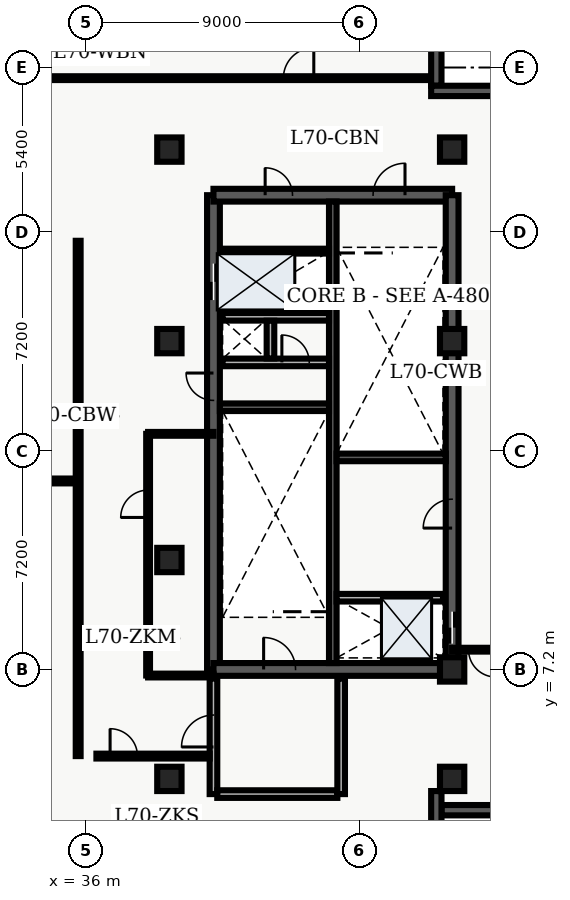
"""IFC4 building model, lengths in metres.
Left out: names, types, materials, properties, quantities, classifications, styles, units other than length and angle.
Written with IfcOpenShell. Run it as: python <this file> out.ifc"""

import sys

from ifc_helpers import new_model, entity, si_unit, converted_unit, direction, frame, origin_with_axes, origin_2d_with_axis, place, context, subcontext, project, spatial, polyline, rectangle, outline, extrude, element, fill, save


model = new_model("IFC4")
c1 = context("Model", 3, precision=1e-05, world=origin_with_axes(), true_north=direction((0.0, 1.0)))
c2 = subcontext(c1, "Body", "Model", "MODEL_VIEW")
j1 = project(units=[si_unit("LENGTHUNIT", "METRE"), converted_unit("PLANEANGLEUNIT", "DEGREE", entity("IfcPlaneAngleMeasure", 0.017), si_unit("PLANEANGLEUNIT", "RADIAN"), dimensions=[0, 0, 0, 0, 0, 0, 0])], contexts=[c1])
p1 = place(None, origin_with_axes())
s1 = spatial("IfcSite", under=j1, at=p1, CompositionType="ELEMENT")
p2 = place(p1, origin_with_axes())
s2 = spatial("IfcBuilding", under=s1, at=p2, CompositionType="ELEMENT")
p3 = place(p2, frame((0.0, 0.0, 284.1), z_axis=(0.0, 0.0, 1.0), x_axis=(1.0, 0.0, 0.0)))
s3 = spatial("IfcBuildingStorey", under=s2, at=p3, CompositionType="ELEMENT", Elevation=284.1)
p4 = place(p3, frame((40.2, 7.2, 0.0), z_axis=(0.0, 0.0, 1.0), x_axis=(0.0, 1.0, 0.0)))
e1 = element("IfcWall", 1, at=p4, inside=s3, PredefinedType="SHEAR", context=c2, shape_type="SweptSolid", body=[
    extrude(outline(polyline([(0.0, -0.21), (15.6, -0.21), (15.6, 0.21), (0.0, 0.21), (0.0, -0.21)])), origin_with_axes(), (0.0, 0.0, 1.0), 3.6),
])
p5 = place(p4, frame((12.75, 0.0, 0.0), z_axis=(0.0, 0.0, 1.0), x_axis=(1.0, 0.0, 0.0)))
e2 = element("IfcOpeningElement", 2, at=p5, cuts=e1, PredefinedType="OPENING", context=c2, shape_type="SweptSolid", body=[
    extrude(rectangle(XDim=1.2, YDim=0.44, at=origin_2d_with_axis()), origin_with_axes(), (0.0, 0.0, 1.0), 2.15),
])
p6 = place(p4, frame((9.3, 0.0, 0.0), z_axis=(0.0, 0.0, 1.0), x_axis=(1.0, 0.0, 0.0)))
e3 = element("IfcOpeningElement", 3, at=p6, cuts=e1, PredefinedType="OPENING", context=c2, shape_type="SweptSolid", body=[
    extrude(rectangle(XDim=0.9, YDim=0.44, at=origin_2d_with_axis()), origin_with_axes(), (0.0, 0.0, 1.0), 2.15),
])
p7 = place(p3, frame((40.2, 7.2, 0.0), z_axis=(0.0, 0.0, 1.0), x_axis=(1.0, 0.0, 0.0)))
e4 = element("IfcWall", 4, at=p7, inside=s3, PredefinedType="SHEAR", context=c2, shape_type="SweptSolid", body=[
    extrude(outline(polyline([(0.0, -0.21), (7.85, -0.21), (7.85, 0.21), (0.0, 0.21), (0.0, -0.21)])), origin_with_axes(), (0.0, 0.0, 1.0), 3.6),
])
p8 = place(p7, frame((2.175, 0.0, 0.0), z_axis=(0.0, 0.0, 1.0), x_axis=(1.0, 0.0, 0.0)))
e5 = element("IfcOpeningElement", 5, at=p8, cuts=e4, PredefinedType="OPENING", context=c2, shape_type="SweptSolid", body=[
    extrude(rectangle(XDim=1.05, YDim=0.44, at=origin_2d_with_axis()), origin_with_axes(), (0.0, 0.0, 1.0), 2.15),
])
p9 = place(p3, frame((40.2, 22.8, 0.0), z_axis=(0.0, 0.0, 1.0), x_axis=(1.0, 0.0, 0.0)))
e6 = element("IfcWall", 6, at=p9, inside=s3, PredefinedType="SHEAR", context=c2, shape_type="SweptSolid", body=[
    extrude(outline(polyline([(0.0, -0.21), (7.85, -0.21), (7.85, 0.21), (0.0, 0.21), (0.0, -0.21)])), origin_with_axes(), (0.0, 0.0, 1.0), 3.6),
])
p10 = place(p9, frame((5.775, 0.0, 0.0), z_axis=(0.0, 0.0, 1.0), x_axis=(1.0, 0.0, 0.0)))
e7 = element("IfcOpeningElement", 7, at=p10, cuts=e6, PredefinedType="OPENING", context=c2, shape_type="SweptSolid", body=[
    extrude(rectangle(XDim=1.05, YDim=0.44, at=origin_2d_with_axis()), origin_with_axes(), (0.0, 0.0, 1.0), 2.15),
])
p11 = place(p9, frame((2.15, 0.0, 0.0), z_axis=(0.0, 0.0, 1.0), x_axis=(1.0, 0.0, 0.0)))
e8 = element("IfcOpeningElement", 8, at=p11, cuts=e6, PredefinedType="OPENING", context=c2, shape_type="SweptSolid", body=[
    extrude(rectangle(XDim=0.9, YDim=0.44, at=origin_2d_with_axis()), origin_with_axes(), (0.0, 0.0, 1.0), 2.15),
])
p12 = place(p3, frame((48.05, 7.2, 0.0), z_axis=(0.0, 0.0, 1.0), x_axis=(0.0, 1.0, 0.0)))
e9 = element("IfcWall", 9, at=p12, inside=s3, PredefinedType="SHEAR", context=c2, shape_type="SweptSolid", body=[
    extrude(outline(polyline([(0.0, -0.21), (15.6, -0.21), (15.6, 0.21), (0.0, 0.21), (0.0, -0.21)])), origin_with_axes(), (0.0, 0.0, 1.0), 3.6),
])
p13 = place(p12, frame((1.375, 0.0, 0.0), z_axis=(0.0, 0.0, 1.0), x_axis=(1.0, 0.0, 0.0)))
e10 = element("IfcOpeningElement", 10, at=p13, cuts=e9, PredefinedType="OPENING", context=c2, shape_type="SweptSolid", body=[
    extrude(rectangle(XDim=1.05, YDim=0.44, at=origin_2d_with_axis()), origin_with_axes(), (0.0, 0.0, 1.0), 2.15),
])
p14 = place(p12, frame((5.125, 0.0, 0.0), z_axis=(0.0, 0.0, 1.0), x_axis=(1.0, 0.0, 0.0)))
e11 = element("IfcOpeningElement", 11, at=p14, cuts=e9, PredefinedType="OPENING", context=c2, shape_type="SweptSolid", body=[
    extrude(rectangle(XDim=0.95, YDim=0.44, at=origin_2d_with_axis()), origin_with_axes(), (0.0, 0.0, 1.0), 2.15),
])
p15 = place(p3, frame((44.125, 7.41, 0.0), z_axis=(0.0, 0.0, 1.0), x_axis=(0.0, 1.0, 0.0)))
e12 = element("IfcWall", 12, at=p15, inside=s3, PredefinedType="SHEAR", context=c2, shape_type="SweptSolid", body=[
    extrude(outline(polyline([(0.0, -0.125), (15.18, -0.125), (15.18, 0.125), (0.0, 0.125), (0.0, -0.125)])), origin_with_axes(), (0.0, 0.0, 1.0), 3.6),
])
for number, where, z_axis, x_axis in (
    (13, (40.41, 15.825, 0.0), (0.0, 0.0, 1.0), (1.0, 0.0, 0.0)),
    (14, (44.25, 14.175, 0.0), (0.0, 0.0, 1.0), (1.0, 0.0, 0.0)),
):
    element("IfcWall", number, at=place(p3, frame(where, z_axis=z_axis, x_axis=x_axis)), inside=s3, PredefinedType="SHEAR", context=c2, shape_type="SweptSolid", body=[
        extrude(outline(polyline([(0.0, -0.125), (3.59, -0.125), (3.59, 0.125), (0.0, 0.125), (0.0, -0.125)])), origin_with_axes(), (0.0, 0.0, 1.0), 3.6),
    ])
p16 = place(p3, frame((40.5, 17.3, 0.0), z_axis=(0.0, 0.0, 1.0), x_axis=(1.0, 0.0, 0.0)))
e15 = element("IfcWall", 15, at=p16, inside=s3, PredefinedType="SOLIDWALL", context=c2, shape_type="SweptSolid", body=[
    extrude(outline(polyline([(0.0, -0.125), (3.5, -0.125), (3.5, 0.125), (0.0, 0.125), (0.0, -0.125)])), origin_with_axes(), (0.0, 0.0, 1.0), 2.64),
])
p17 = place(p16, frame((2.4, 0.0, 0.0), z_axis=(0.0, 0.0, 1.0), x_axis=(1.0, 0.0, 0.0)))
e16 = element("IfcOpeningElement", 16, at=p17, cuts=e15, PredefinedType="OPENING", context=c2, shape_type="SweptSolid", body=[
    extrude(rectangle(XDim=0.9, YDim=0.27, at=origin_2d_with_axis()), origin_with_axes(), (0.0, 0.0, 1.0), 2.15),
])
p18 = place(p3, frame((40.5, 18.8, 0.0), z_axis=(0.0, 0.0, 1.0), x_axis=(1.0, 0.0, 0.0)))
e17 = element("IfcWall", 17, at=p18, inside=s3, PredefinedType="SOLIDWALL", context=c2, shape_type="SweptSolid", body=[
    extrude(outline(polyline([(0.0, -0.125), (3.5, -0.125), (3.5, 0.125), (0.0, 0.125), (0.0, -0.125)])), origin_with_axes(), (0.0, 0.0, 1.0), 2.64),
])
p19 = place(p3, frame((42.075, 17.43, 0.0), z_axis=(0.0, 0.0, 1.0), x_axis=(0.0, 1.0, 0.0)))
e18 = element("IfcWall", 18, at=p19, inside=s3, PredefinedType="SOLIDWALL", context=c2, shape_type="SweptSolid", body=[
    extrude(outline(polyline([(0.0, -0.125), (1.24, -0.125), (1.24, 0.125), (0.0, 0.125), (0.0, -0.125)])), origin_with_axes(), (0.0, 0.0, 1.0), 2.64),
])
p20 = place(p3, frame((40.2, 3.1, 0.0), z_axis=(0.0, 0.0, 1.0), x_axis=(0.0, 1.0, 0.0)))
e19 = element("IfcWall", 19, at=p20, inside=s3, PredefinedType="SOLIDWALL", context=c2, shape_type="SweptSolid", body=[
    extrude(outline(polyline([(0.0, -0.125), (3.8, -0.125), (3.8, 0.125), (0.0, 0.125), (0.0, -0.125)])), origin_with_axes(), (0.0, 0.0, 1.0), 2.64),
])
p21 = place(p20, frame((2.075, 0.0, 0.0), z_axis=(0.0, 0.0, 1.0), x_axis=(1.0, 0.0, 0.0)))
e20 = element("IfcOpeningElement", 20, at=p21, cuts=e19, PredefinedType="OPENING", context=c2, shape_type="SweptSolid", body=[
    extrude(rectangle(XDim=1.05, YDim=0.27, at=origin_2d_with_axis()), origin_with_axes(), (0.0, 0.0, 1.0), 2.15),
])
p22 = place(p3, frame((40.325, 3.1, 0.0), z_axis=(0.0, 0.0, 1.0), x_axis=(1.0, 0.0, 0.0)))
e21 = element("IfcWall", 21, at=p22, inside=s3, PredefinedType="SOLIDWALL", context=c2, shape_type="SweptSolid", body=[
    extrude(outline(polyline([(0.0, -0.125), (3.95, -0.125), (3.95, 0.125), (0.0, 0.125), (0.0, -0.125)])), origin_with_axes(), (0.0, 0.0, 1.0), 2.64),
])
p23 = place(p3, frame((44.4, 3.1, 0.0), z_axis=(0.0, 0.0, 1.0), x_axis=(0.0, 1.0, 0.0)))
e22 = element("IfcWall", 22, at=p23, inside=s3, PredefinedType="SOLIDWALL", context=c2, shape_type="SweptSolid", body=[
    extrude(outline(polyline([(0.0, -0.125), (3.8, -0.125), (3.8, 0.125), (0.0, 0.125), (0.0, -0.125)])), origin_with_axes(), (0.0, 0.0, 1.0), 2.64),
])
for number, where, z_axis, x_axis in (
    (23, (38.75, 3.6, 0.0), (0.0, 0.0, 1.0), (1.0, 0.0, 0.0)),
    (24, (38.75, 10.8, 0.0), (0.0, 0.0, 1.0), (1.0, 0.0, 0.0)),
    (25, (38.75, 18.0, 0.0), (0.0, 0.0, 1.0), (1.0, 0.0, 0.0)),
    (26, (38.75, 24.3, 0.0), (0.0, 0.0, 1.0), (1.0, 0.0, 0.0)),
    (27, (48.05, 3.6, 0.0), (0.0, 0.0, 1.0), (1.0, 0.0, 0.0)),
    (28, (48.05, 7.2, 0.0), (0.0, 0.0, 1.0), (1.0, 0.0, 0.0)),
    (29, (48.05, 18.0, 0.0), (0.0, 0.0, 1.0), (1.0, 0.0, 0.0)),
    (30, (48.05, 24.3, 0.0), (0.0, 0.0, 1.0), (1.0, 0.0, 0.0)),
):
    element("IfcColumn", number, at=place(p3, frame(where, z_axis=z_axis, x_axis=x_axis)), inside=s3, PredefinedType="COLUMN", context=c2, shape_type="SweptSolid", body=[
        extrude(rectangle(XDim=0.8, YDim=0.8, at=origin_2d_with_axis()), origin_with_axes(), (0.0, 0.0, 1.0), 3.9),
    ])
p24 = place(p3, frame((40.5, 20.96, 0.0), z_axis=(0.0, 0.0, 1.0), x_axis=(1.0, 0.0, 0.0)))
e31 = element("IfcWall", 31, at=p24, inside=s3, PredefinedType="PARTITIONING", context=c2, shape_type="SweptSolid", body=[
    extrude(outline(polyline([(0.0, -0.08), (3.5, -0.08), (3.5, 0.08), (0.0, 0.08), (0.0, -0.08)])), origin_with_axes(), (0.0, 0.0, 1.0), 2.64),
])
p25 = place(p3, frame((44.25, 9.56, 0.0), z_axis=(0.0, 0.0, 1.0), x_axis=(1.0, 0.0, 0.0)))
e32 = element("IfcWall", 32, at=p25, inside=s3, PredefinedType="SOLIDWALL", context=c2, shape_type="SweptSolid", body=[
    extrude(outline(polyline([(0.0, -0.125), (3.5, -0.125), (3.5, 0.125), (0.0, 0.125), (0.0, -0.125)])), origin_with_axes(), (0.0, 0.0, 1.0), 2.64),
])
p26 = place(p3, frame((20.3, 13.4, 0.0), z_axis=(0.0, 0.0, 1.0), x_axis=(1.0, 0.0, 0.0)))
e33 = element("IfcWall", 33, at=p26, inside=s3, PredefinedType="PARTITIONING", context=c2, shape_type="SweptSolid", body=[
    extrude(outline(polyline([(0.0, -0.08), (15.45, -0.08), (15.45, 0.08), (0.0, 0.08), (0.0, -0.08)])), origin_with_axes(), (0.0, 0.0, 1.0), 2.64),
])
p27 = place(p26, frame((2.304, 0.0, 0.0), z_axis=(0.0, 0.0, 1.0), x_axis=(1.0, 0.0, 0.0)))
e34 = element("IfcOpeningElement", 34, at=p27, cuts=e33, PredefinedType="OPENING", context=c2, shape_type="SweptSolid", body=[
    extrude(rectangle(XDim=1.0, YDim=0.18, at=origin_2d_with_axis()), origin_with_axes(), (0.0, 0.0, 1.0), 2.15),
])
p28 = place(p26, frame((6.866, 0.0, 0.0), z_axis=(0.0, 0.0, 1.0), x_axis=(1.0, 0.0, 0.0)))
e35 = element("IfcOpeningElement", 35, at=p28, cuts=e33, PredefinedType="OPENING", context=c2, shape_type="SweptSolid", body=[
    extrude(rectangle(XDim=1.0, YDim=0.18, at=origin_2d_with_axis()), origin_with_axes(), (0.0, 0.0, 1.0), 2.15),
])
p29 = place(p26, frame((12.337, 0.0, 0.0), z_axis=(0.0, 0.0, 1.0), x_axis=(1.0, 0.0, 0.0)))
e36 = element("IfcOpeningElement", 36, at=p29, cuts=e33, PredefinedType="OPENING", context=c2, shape_type="SweptSolid", body=[
    extrude(rectangle(XDim=1.2, YDim=0.18, at=origin_2d_with_axis()), origin_with_axes(), (0.0, 0.0, 1.0), 2.2),
])
p30 = place(p3, frame((20.3, 15.7, 0.0), z_axis=(0.0, 0.0, 1.0), x_axis=(1.0, 0.0, 0.0)))
e37 = element("IfcWall", 37, at=p30, inside=s3, PredefinedType="PARTITIONING", context=c2, shape_type="SweptSolid", body=[
    extrude(outline(polyline([(0.0, -0.08), (15.45, -0.08), (15.45, 0.08), (0.0, 0.08), (0.0, -0.08)])), origin_with_axes(), (0.0, 0.0, 1.0), 2.64),
])
p31 = place(p30, frame((7.775, 0.0, 0.0), z_axis=(0.0, 0.0, 1.0), x_axis=(1.0, 0.0, 0.0)))
e38 = element("IfcOpeningElement", 38, at=p31, cuts=e37, PredefinedType="OPENING", context=c2, shape_type="SweptSolid", body=[
    extrude(rectangle(XDim=1.0, YDim=0.18, at=origin_2d_with_axis()), origin_with_axes(), (0.0, 0.0, 1.0), 2.15),
])
p32 = place(p3, frame((35.75, 4.35, 0.0), z_axis=(0.0, 0.0, 1.0), x_axis=(0.0, 1.0, 0.0)))
e39 = element("IfcWall", 39, at=p32, inside=s3, PredefinedType="PARTITIONING", context=c2, shape_type="SweptSolid", body=[
    extrude(outline(polyline([(0.0, -0.08), (16.95, -0.08), (16.95, 0.08), (0.0, 0.08), (0.0, -0.08)])), origin_with_axes(), (0.0, 0.0, 1.0), 2.64),
])
p33 = place(p3, frame((49.765, 7.85, 0.0), z_axis=(0.0, 0.0, 1.0), x_axis=(-1.0, 0.0, 0.0)))
e40 = element("IfcWall", 40, at=p33, inside=s3, PredefinedType="PARTITIONING", context=c2, shape_type="SweptSolid", body=[
    extrude(outline(polyline([(0.0, -0.062), (1.715, -0.062), (1.715, 0.062), (0.0, 0.062), (0.0, -0.062)])), origin_with_axes(), (0.0, 0.0, 1.0), 2.64),
])
p34 = place(p33, frame((0.725, 0.0, 0.0), z_axis=(0.0, 0.0, 1.0), x_axis=(1.0, 0.0, 0.0)))
e41 = element("IfcOpeningElement", 41, at=p34, cuts=e40, PredefinedType="OPENING", context=c2, shape_type="SweptSolid", body=[
    extrude(rectangle(XDim=0.9, YDim=0.145, at=origin_2d_with_axis()), origin_with_axes(), (0.0, 0.0, 1.0), 2.15),
])
p35 = place(p3, frame((34.535, 26.65, 0.0), z_axis=(0.0, 0.0, 1.0), x_axis=(1.0, 0.0, 0.0)))
e42 = element("IfcWall", 42, at=p35, inside=s3, PredefinedType="PARTITIONING", context=c2, shape_type="SweptSolid", body=[
    extrude(outline(polyline([(0.0, -0.062), (12.995, -0.062), (12.995, 0.062), (0.0, 0.062), (0.0, -0.062)])), origin_with_axes(), (0.0, 0.0, 1.0), 2.64),
])
p36 = place(p35, frame((8.465, 0.0, 0.0), z_axis=(0.0, 0.0, 1.0), x_axis=(1.0, 0.0, 0.0)))
e43 = element("IfcOpeningElement", 43, at=p36, cuts=e42, PredefinedType="OPENING", context=c2, shape_type="SweptSolid", body=[
    extrude(rectangle(XDim=1.0, YDim=0.145, at=origin_2d_with_axis()), origin_with_axes(), (0.0, 0.0, 1.0), 2.15),
])
p37 = place(p3, frame((36.35, 4.35, 0.0), z_axis=(0.0, 0.0, 1.0), x_axis=(1.0, 0.0, 0.0)))
e44 = element("IfcWall", 44, at=p37, inside=s3, PredefinedType="PARTITIONING", context=c2, shape_type="SweptSolid", body=[
    extrude(outline(polyline([(0.0, -0.08), (3.725, -0.08), (3.725, 0.08), (0.0, 0.08), (0.0, -0.08)])), origin_with_axes(), (0.0, 0.0, 1.0), 2.64),
])
p38 = place(p37, frame((0.9, 0.0, 0.0), z_axis=(0.0, 0.0, 1.0), x_axis=(1.0, 0.0, 0.0)))
e45 = element("IfcOpeningElement", 45, at=p38, cuts=e44, PredefinedType="OPENING", context=c2, shape_type="SweptSolid", body=[
    extrude(rectangle(XDim=0.9, YDim=0.18, at=origin_2d_with_axis()), origin_with_axes(), (0.0, 0.0, 1.0), 2.15),
])
for number, where, z_axis, x_axis in (
    (46, (38.05, 7.0, 0.0), (0.0, 0.0, 1.0), (1.0, 0.0, 0.0)),
    (47, (38.05, 14.95, 0.0), (0.0, 0.0, 1.0), (1.0, 0.0, 0.0)),
):
    element("IfcWall", number, at=place(p3, frame(where, z_axis=z_axis, x_axis=x_axis)), inside=s3, PredefinedType="PARTITIONING", context=c2, shape_type="SweptSolid", body=[
        extrude(outline(polyline([(0.0, -0.062), (2.15, -0.062), (2.15, 0.062), (0.0, 0.062), (0.0, -0.062)])), origin_with_axes(), (0.0, 0.0, 1.0), 2.64),
    ])
p39 = place(p3, frame((38.05, 7.0, 0.0), z_axis=(0.0, 0.0, 1.0), x_axis=(0.0, 1.0, 0.0)))
e48 = element("IfcWall", 48, at=p39, inside=s3, PredefinedType="PARTITIONING", context=c2, shape_type="SweptSolid", body=[
    extrude(outline(polyline([(0.0, -0.062), (7.95, -0.062), (7.95, 0.062), (0.0, 0.062), (0.0, -0.062)])), origin_with_axes(), (0.0, 0.0, 1.0), 2.64),
])
p40 = place(p39, frame((5.65, 0.0, 0.0), z_axis=(0.0, 0.0, 1.0), x_axis=(1.0, 0.0, 0.0)))
e49 = element("IfcOpeningElement", 49, at=p40, cuts=e48, PredefinedType="OPENING", context=c2, shape_type="SweptSolid", body=[
    extrude(rectangle(XDim=0.9, YDim=0.145, at=origin_2d_with_axis()), origin_with_axes(), (0.0, 0.0, 1.0), 2.15),
])
p41 = place(p3, frame((47.53, 28.46, 0.0), z_axis=(0.0, 0.0, 1.0), x_axis=(0.0, -1.0, 0.0)))
e50 = element("IfcWall", 50, at=p41, inside=s3, PredefinedType="SOLIDWALL", context=c2, shape_type="SweptSolid", body=[
    extrude(outline(polyline([(0.0, -0.17), (2.06, -0.17), (2.06, 0.17), (0.0, 0.17), (0.0, -0.17)])), origin_with_axes(), (0.0, 0.0, 1.0), 3.6),
])
p42 = place(p3, frame((47.36, 26.23, 0.0), z_axis=(0.0, 0.0, 1.0), x_axis=(1.0, 0.0, 0.0)))
e51 = element("IfcWall", 51, at=p42, inside=s3, PredefinedType="SOLIDWALL", context=c2, shape_type="SweptSolid", body=[
    extrude(outline(polyline([(0.0, -0.17), (2.74, -0.17), (2.74, 0.17), (0.0, 0.17), (0.0, -0.17)])), origin_with_axes(), (0.0, 0.0, 1.0), 3.6),
])
p43 = place(p3, frame((49.76, 2.57, 0.0), z_axis=(0.0, 0.0, 1.0), x_axis=(-1.0, 0.0, 0.0)))
e52 = element("IfcWall", 52, at=p43, inside=s3, PredefinedType="SOLIDWALL", context=c2, shape_type="SweptSolid", body=[
    extrude(outline(polyline([(0.0, -0.17), (2.06, -0.17), (2.06, 0.17), (0.0, 0.17), (0.0, -0.17)])), origin_with_axes(), (0.0, 0.0, 1.0), 3.6),
])
p44 = place(p3, frame((47.53, 3.2, 0.0), z_axis=(0.0, 0.0, 1.0), x_axis=(0.0, -1.0, 0.0)))
e53 = element("IfcWall", 53, at=p44, inside=s3, PredefinedType="SOLIDWALL", context=c2, shape_type="SweptSolid", body=[
    extrude(outline(polyline([(0.0, -0.17), (3.2, -0.17), (3.2, 0.17), (0.0, 0.17), (0.0, -0.17)])), origin_with_axes(), (0.0, 0.0, 1.0), 3.6),
])
p45 = place(p12, frame((1.375, 0.0, 0.0), z_axis=(0.0, 0.0, 1.0), x_axis=(1.0, 0.0, 0.0)))
e54 = element("IfcDoor", 54, at=p45, inside=s3, OperationType="SLIDING_TO_LEFT", PredefinedType="DOOR", context=c2, shape_type="SweptSolid", body=[
    extrude(rectangle(XDim=1.05, YDim=0.09, at=origin_2d_with_axis()), origin_with_axes(), (0.0, 0.0, 1.0), 2.15),
])
fill(e10, e54)
p46 = place(p4, frame((12.75, 0.0, 0.0), z_axis=(0.0, 0.0, 1.0), x_axis=(1.0, 0.0, 0.0)))
e55 = element("IfcDoor", 55, at=p46, inside=s3, OperationType="DOUBLE_DOOR_SLIDING", PredefinedType="DOOR", context=c2, shape_type="SweptSolid", body=[
    extrude(rectangle(XDim=1.2, YDim=0.09, at=origin_2d_with_axis()), origin_with_axes(), (0.0, 0.0, 1.0), 2.15),
])
fill(e2, e55)
p47 = place(p4, frame((9.3, 0.0, 0.0), z_axis=(0.0, 0.0, 1.0), x_axis=(1.0, 0.0, 0.0)))
e56 = element("IfcDoor", 56, at=p47, inside=s3, OperationType="SINGLE_SWING_RIGHT", PredefinedType="DOOR", context=c2, shape_type="SweptSolid", body=[
    extrude(rectangle(XDim=0.9, YDim=0.09, at=origin_2d_with_axis()), origin_with_axes(), (0.0, 0.0, 1.0), 2.15),
])
fill(e3, e56)
p48 = place(p16, frame((2.4, 0.0, 0.0), z_axis=(0.0, 0.0, 1.0), x_axis=(1.0, 0.0, 0.0)))
e57 = element("IfcDoor", 57, at=p48, inside=s3, OperationType="SINGLE_SWING_LEFT", PredefinedType="DOOR", context=c2, shape_type="SweptSolid", body=[
    extrude(rectangle(XDim=0.9, YDim=0.09, at=origin_2d_with_axis()), origin_with_axes(), (0.0, 0.0, 1.0), 2.15),
])
fill(e16, e57)
p49 = place(p7, frame((2.175, 0.0, 0.0), z_axis=(0.0, 0.0, 1.0), x_axis=(1.0, 0.0, 0.0)))
e58 = element("IfcDoor", 58, at=p49, inside=s3, OperationType="SINGLE_SWING_LEFT", PredefinedType="DOOR", context=c2, shape_type="SweptSolid", body=[
    extrude(rectangle(XDim=1.05, YDim=0.09, at=origin_2d_with_axis()), origin_with_axes(), (0.0, 0.0, 1.0), 2.15),
])
fill(e5, e58)
p50 = place(p9, frame((5.775, 0.0, 0.0), z_axis=(0.0, 0.0, 1.0), x_axis=(1.0, 0.0, 0.0)))
e59 = element("IfcDoor", 59, at=p50, inside=s3, OperationType="SINGLE_SWING_RIGHT", PredefinedType="DOOR", context=c2, shape_type="SweptSolid", body=[
    extrude(rectangle(XDim=1.05, YDim=0.09, at=origin_2d_with_axis()), origin_with_axes(), (0.0, 0.0, 1.0), 2.15),
])
fill(e7, e59)
p51 = place(p20, frame((2.075, 0.0, 0.0), z_axis=(0.0, 0.0, 1.0), x_axis=(1.0, 0.0, 0.0)))
e60 = element("IfcDoor", 60, at=p51, inside=s3, OperationType="SINGLE_SWING_LEFT", PredefinedType="DOOR", context=c2, shape_type="SweptSolid", body=[
    extrude(rectangle(XDim=1.05, YDim=0.09, at=origin_2d_with_axis()), origin_with_axes(), (0.0, 0.0, 1.0), 2.15),
])
fill(e20, e60)
p52 = place(p9, frame((2.15, 0.0, 0.0), z_axis=(0.0, 0.0, 1.0), x_axis=(1.0, 0.0, 0.0)))
e61 = element("IfcDoor", 61, at=p52, inside=s3, OperationType="SINGLE_SWING_LEFT", PredefinedType="DOOR", context=c2, shape_type="SweptSolid", body=[
    extrude(rectangle(XDim=0.9, YDim=0.09, at=origin_2d_with_axis()), origin_with_axes(), (0.0, 0.0, 1.0), 2.15),
])
fill(e8, e61)
p53 = place(p12, frame((5.125, 0.0, 0.0), z_axis=(0.0, 0.0, 1.0), x_axis=(1.0, 0.0, 0.0)))
e62 = element("IfcDoor", 62, at=p53, inside=s3, OperationType="SINGLE_SWING_LEFT", PredefinedType="DOOR", context=c2, shape_type="SweptSolid", body=[
    extrude(rectangle(XDim=0.95, YDim=0.09, at=origin_2d_with_axis()), origin_with_axes(), (0.0, 0.0, 1.0), 2.15),
])
fill(e11, e62)
p54 = place(p33, frame((0.725, 0.0, 0.0), z_axis=(0.0, 0.0, 1.0), x_axis=(1.0, 0.0, 0.0)))
e63 = element("IfcDoor", 63, at=p54, inside=s3, OperationType="SINGLE_SWING_LEFT", PredefinedType="DOOR", context=c2, shape_type="SweptSolid", body=[
    extrude(rectangle(XDim=0.9, YDim=0.075, at=origin_2d_with_axis()), origin_with_axes(), (0.0, 0.0, 1.0), 2.15),
])
fill(e41, e63)
p55 = place(p35, frame((8.465, 0.0, 0.0), z_axis=(0.0, 0.0, 1.0), x_axis=(1.0, 0.0, 0.0)))
e64 = element("IfcDoor", 64, at=p55, inside=s3, OperationType="SINGLE_SWING_RIGHT", PredefinedType="DOOR", context=c2, shape_type="SweptSolid", body=[
    extrude(rectangle(XDim=1.0, YDim=0.075, at=origin_2d_with_axis()), origin_with_axes(), (0.0, 0.0, 1.0), 2.15),
])
fill(e43, e64)
p56 = place(p37, frame((0.9, 0.0, 0.0), z_axis=(0.0, 0.0, 1.0), x_axis=(1.0, 0.0, 0.0)))
e65 = element("IfcDoor", 65, at=p56, inside=s3, OperationType="SINGLE_SWING_LEFT", PredefinedType="DOOR", context=c2, shape_type="SweptSolid", body=[
    extrude(rectangle(XDim=0.9, YDim=0.09, at=origin_2d_with_axis()), origin_with_axes(), (0.0, 0.0, 1.0), 2.15),
])
fill(e45, e65)
p57 = place(p39, frame((5.65, 0.0, 0.0), z_axis=(0.0, 0.0, 1.0), x_axis=(1.0, 0.0, 0.0)))
e66 = element("IfcDoor", 66, at=p57, inside=s3, OperationType="SINGLE_SWING_LEFT", PredefinedType="DOOR", context=c2, shape_type="SweptSolid", body=[
    extrude(rectangle(XDim=0.9, YDim=0.075, at=origin_2d_with_axis()), origin_with_axes(), (0.0, 0.0, 1.0), 2.15),
])
fill(e49, e66)
save(model, sys.argv[1])
